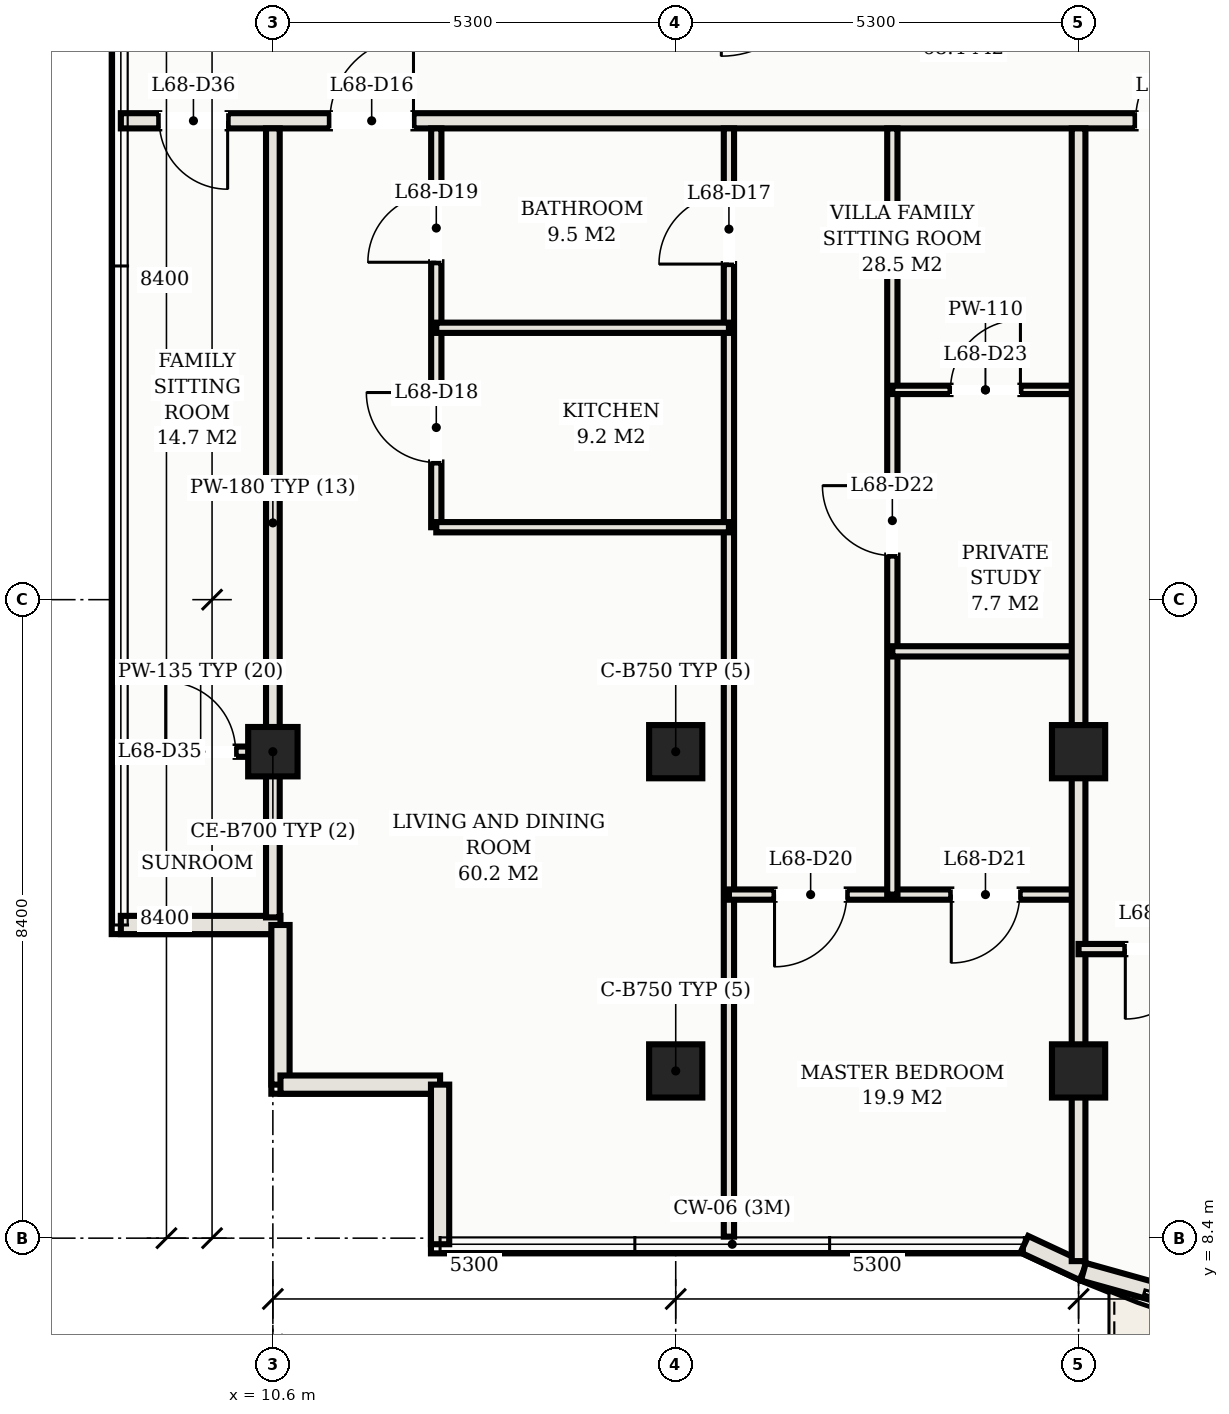
"""IFC4 building model, lengths in metres.
Left out: names, types, materials, properties, quantities, classifications, styles, units other than length and angle.
Written with IfcOpenShell. Run it as: python <this file> out.ifc"""

import sys

from ifc_helpers import new_model, si_unit, direction, frame, frame_2d, origin, origin_2d, place, context, subcontext, project, spatial, rectangle, hollow_rectangle, extrude, element, fill, save


model = new_model("IFC4")
c1 = context("Model", 3, precision=1e-05, world=origin(), true_north=direction((0.0, 1.0)))
c2 = subcontext(c1, "Body", "Model", "MODEL_VIEW")
j1 = project(units=[si_unit("LENGTHUNIT", "METRE"), si_unit("PLANEANGLEUNIT", "RADIAN")], contexts=[c1])
p1 = place(None, origin())
s1 = spatial("IfcSite", under=j1, at=p1, CompositionType="ELEMENT")
p2 = place(p1, origin())
s2 = spatial("IfcBuilding", under=s1, at=p2, CompositionType="ELEMENT")
p3 = place(p2, frame((0.0, 0.0, 246.2)))
s3 = spatial("IfcBuildingStorey", under=s2, at=p3, CompositionType="ELEMENT", Elevation=246.2)
for number, where, z_axis, x_axis in (
    (1, (15.9, 14.8, 0.0), (0.0, 0.0, 1.0), (1.0, 0.0, 0.0)),
    (2, (15.9, 10.6, 0.0), (0.0, 0.0, 1.0), (1.0, 0.0, 0.0)),
    (3, (21.2, 14.8, 0.0), (0.0, 0.0, 1.0), (1.0, 0.0, 0.0)),
    (4, (21.2, 10.6, 0.0), (0.0, 0.0, 1.0), (1.0, 0.0, 0.0)),
):
    element("IfcColumn", number, at=place(p3, frame(where, z_axis=z_axis, x_axis=x_axis)), inside=s3, PredefinedType="COLUMN", context=c2, shape_type="SweptSolid", body=[
        extrude(hollow_rectangle(XDim=0.7, YDim=0.7, WallThickness=0.025, at=origin_2d()), origin(), (0.0, 0.0, 1.0), 3.3),
    ])
p4 = place(p3, frame((10.6, 14.8, 0.0), z_axis=(0.0, 0.0, 1.0), x_axis=(1.0, 0.0, 0.0)))
e5 = element("IfcColumn", 5, at=p4, inside=s3, PredefinedType="COLUMN", context=c2, shape_type="SweptSolid", body=[
    extrude(hollow_rectangle(XDim=0.65, YDim=0.65, WallThickness=0.022, at=origin_2d()), origin(), (0.0, 0.0, 1.0), 3.3),
])
p5 = place(p3, frame((8.6, 12.52, 0.0), z_axis=(0.0, 0.0, 1.0), x_axis=(1.0, 0.0, 0.0)))
e6 = element("IfcWall", 6, at=p5, inside=s3, PredefinedType="SOLIDWALL", context=c2, shape_type="SweptSolid", body=[
    extrude(rectangle(XDim=2.1, YDim=0.24, at=frame_2d((1.05, 0.0))), origin(), (0.0, 0.0, 1.0), 3.11),
])
for number, where, z_axis, x_axis in (
    (7, (10.7, 12.52, 0.0), (0.0, 0.0, 1.0), (0.0, -1.0, 0.0)),
    (8, (10.7, 10.42, 0.0), (0.0, 0.0, 1.0), (1.0, 0.0, 0.0)),
):
    element("IfcWall", number, at=place(p3, frame(where, z_axis=z_axis, x_axis=x_axis)), inside=s3, PredefinedType="SOLIDWALL", context=c2, shape_type="SweptSolid", body=[
        extrude(rectangle(XDim=2.1, YDim=0.24, at=frame_2d((1.05, 0.0))), origin(), (0.0, 0.0, 1.0), 3.11),
    ])
p6 = place(p3, frame((12.8, 10.42, 0.0), z_axis=(0.0, 0.0, 1.0), x_axis=(0.0, -1.0, 0.0)))
e9 = element("IfcWall", 9, at=p6, inside=s3, PredefinedType="SOLIDWALL", context=c2, shape_type="SweptSolid", body=[
    extrude(rectangle(XDim=2.1, YDim=0.24, at=frame_2d((1.05, 0.0))), origin(), (0.0, 0.0, 1.0), 3.11),
])
p7 = place(p3, frame((20.487, 8.32, 0.0), z_axis=(0.0, 0.0, 1.0), x_axis=(0.906190424584, -0.422869855147, 0.0)))
e10 = element("IfcWall", 10, at=p7, inside=s3, PredefinedType="SOLIDWALL", context=c2, shape_type="SweptSolid", body=[
    extrude(rectangle(XDim=0.856, YDim=0.24, at=frame_2d((0.428, 0.0))), origin(), (0.0, 0.0, 1.0), 3.11),
])
p8 = place(p3, frame((21.263, 7.958, 0.0), z_axis=(0.0, 0.0, 1.0), x_axis=(0.963152398068, -0.268956238255, 0.0)))
e11 = element("IfcWall", 11, at=p8, inside=s3, PredefinedType="SOLIDWALL", context=c2, shape_type="SweptSolid", body=[
    extrude(rectangle(XDim=3.885, YDim=0.24, at=frame_2d((1.942, 0.0))), origin(), (0.0, 0.0, 1.0), 3.11),
])
p9 = place(p8, frame((1.169, 0.0, 0.0)))
e12 = element("IfcOpeningElement", 12, at=p9, cuts=e11, PredefinedType="OPENING", context=c2, shape_type="SweptSolid", body=[
    extrude(rectangle(XDim=1.8, YDim=2.2, at=frame_2d((0.9, 1.1))), frame((0.0, 0.13, 0.0), z_axis=(0.0, -1.0, 0.0), x_axis=(1.0, 0.0, 0.0)), (0.0, 0.0, 1.0), 0.26),
])
p10 = place(p3, frame((8.6, 23.1, 0.0), z_axis=(0.0, 0.0, 1.0), x_axis=(1.0, 0.0, 0.0)))
e13 = element("IfcWall", 13, at=p10, inside=s3, PredefinedType="PARTITIONING", context=c2, shape_type="SweptSolid", body=[
    extrude(rectangle(XDim=35.8, YDim=0.2, at=frame_2d((17.9, 0.0))), origin(), (0.0, 0.0, 1.0), 2.45),
])
p11 = place(p10, frame((2.75, 0.0, 0.0)))
e14 = element("IfcOpeningElement", 14, at=p11, cuts=e13, PredefinedType="OPENING", context=c2, shape_type="SweptSolid", body=[
    extrude(rectangle(XDim=1.1, YDim=2.25, at=frame_2d((0.55, 1.125))), frame((0.0, 0.11, 0.0), z_axis=(0.0, -1.0, 0.0), x_axis=(1.0, 0.0, 0.0)), (0.0, 0.0, 1.0), 0.22),
])
p12 = place(p10, frame((13.35, 0.0, 0.0)))
e15 = element("IfcOpeningElement", 15, at=p12, cuts=e13, PredefinedType="OPENING", context=c2, shape_type="SweptSolid", body=[
    extrude(rectangle(XDim=1.1, YDim=2.25, at=frame_2d((0.55, 1.125))), frame((0.0, 0.11, 0.0), z_axis=(0.0, -1.0, 0.0), x_axis=(1.0, 0.0, 0.0)), (0.0, 0.0, 1.0), 0.22),
])
p13 = place(p10, frame((23.95, 0.0, 0.0)))
e16 = element("IfcOpeningElement", 16, at=p13, cuts=e13, PredefinedType="OPENING", context=c2, shape_type="SweptSolid", body=[
    extrude(rectangle(XDim=1.1, YDim=2.25, at=frame_2d((0.55, 1.125))), frame((0.0, 0.11, 0.0), z_axis=(0.0, -1.0, 0.0), x_axis=(1.0, 0.0, 0.0)), (0.0, 0.0, 1.0), 0.22),
])
p14 = place(p10, frame((29.25, 0.0, 0.0)))
e17 = element("IfcOpeningElement", 17, at=p14, cuts=e13, PredefinedType="OPENING", context=c2, shape_type="SweptSolid", body=[
    extrude(rectangle(XDim=1.1, YDim=2.25, at=frame_2d((0.55, 1.125))), frame((0.0, 0.11, 0.0), z_axis=(0.0, -1.0, 0.0), x_axis=(1.0, 0.0, 0.0)), (0.0, 0.0, 1.0), 0.22),
])
p15 = place(p10, frame((0.505, 0.0, 0.0)))
e18 = element("IfcOpeningElement", 18, at=p15, cuts=e13, PredefinedType="OPENING", context=c2, shape_type="SweptSolid", body=[
    extrude(rectangle(XDim=0.9, YDim=2.15, at=frame_2d((0.45, 1.075))), frame((0.0, 0.11, 0.0), z_axis=(0.0, -1.0, 0.0), x_axis=(1.0, 0.0, 0.0)), (0.0, 0.0, 1.0), 0.22),
])
p16 = place(p10, frame((34.395, 0.0, 0.0)))
e19 = element("IfcOpeningElement", 19, at=p16, cuts=e13, PredefinedType="OPENING", context=c2, shape_type="SweptSolid", body=[
    extrude(rectangle(XDim=0.9, YDim=2.15, at=frame_2d((0.45, 1.075))), frame((0.0, 0.11, 0.0), z_axis=(0.0, -1.0, 0.0), x_axis=(1.0, 0.0, 0.0)), (0.0, 0.0, 1.0), 0.22),
])
p17 = place(p3, frame((10.6, 12.62, 0.0), z_axis=(0.0, 0.0, 1.0), x_axis=(0.0, 1.0, 0.0)))
e20 = element("IfcWall", 20, at=p17, inside=s3, PredefinedType="PARTITIONING", context=c2, shape_type="SweptSolid", body=[
    extrude(rectangle(XDim=10.38, YDim=0.18, at=frame_2d((5.19, 0.0))), origin(), (0.0, 0.0, 1.0), 2.45),
])
p18 = place(p3, frame((16.6, 8.42, 0.0), z_axis=(0.0, 0.0, 1.0), x_axis=(0.0, 1.0, 0.0)))
e21 = element("IfcWall", 21, at=p18, inside=s3, PredefinedType="PARTITIONING", context=c2, shape_type="SweptSolid", body=[
    extrude(rectangle(XDim=14.58, YDim=0.135, at=frame_2d((7.29, 0.0))), origin(), (0.0, 0.0, 1.0), 2.45),
])
p19 = place(p18, frame((12.795, 0.0, 0.0)))
e22 = element("IfcOpeningElement", 22, at=p19, cuts=e21, PredefinedType="OPENING", context=c2, shape_type="SweptSolid", body=[
    extrude(rectangle(XDim=0.92, YDim=2.15, at=frame_2d((0.46, 1.075))), frame((0.0, 0.078, 0.0), z_axis=(0.0, -1.0, 0.0), x_axis=(1.0, 0.0, 0.0)), (0.0, 0.0, 1.0), 0.155),
])
p20 = place(p3, frame((12.75, 17.753, 0.0), z_axis=(0.0, 0.0, 1.0), x_axis=(0.0, 1.0, 0.0)))
e23 = element("IfcWall", 23, at=p20, inside=s3, PredefinedType="PARTITIONING", context=c2, shape_type="SweptSolid", body=[
    extrude(rectangle(XDim=5.247, YDim=0.135, at=frame_2d((2.624, 0.0))), origin(), (0.0, 0.0, 1.0), 2.45),
])
p21 = place(p20, frame((0.852, 0.0, 0.0)))
e24 = element("IfcOpeningElement", 24, at=p21, cuts=e23, PredefinedType="OPENING", context=c2, shape_type="SweptSolid", body=[
    extrude(rectangle(XDim=0.92, YDim=2.15, at=frame_2d((0.46, 1.075))), frame((0.0, 0.078, 0.0), z_axis=(0.0, -1.0, 0.0), x_axis=(1.0, 0.0, 0.0)), (0.0, 0.0, 1.0), 0.155),
])
p22 = place(p20, frame((3.486, 0.0, 0.0)))
e25 = element("IfcOpeningElement", 25, at=p22, cuts=e23, PredefinedType="OPENING", context=c2, shape_type="SweptSolid", body=[
    extrude(rectangle(XDim=0.9, YDim=2.15, at=frame_2d((0.45, 1.075))), frame((0.0, 0.078, 0.0), z_axis=(0.0, -1.0, 0.0), x_axis=(1.0, 0.0, 0.0)), (0.0, 0.0, 1.0), 0.155),
])
for number, where, z_axis, x_axis in (
    (26, (12.75, 17.753, 0.0), (0.0, 0.0, 1.0), (1.0, 0.0, 0.0)),
    (27, (12.75, 20.377, 0.0), (0.0, 0.0, 1.0), (1.0, 0.0, 0.0)),
):
    element("IfcWall", number, at=place(p3, frame(where, z_axis=z_axis, x_axis=x_axis)), inside=s3, PredefinedType="PARTITIONING", context=c2, shape_type="SweptSolid", body=[
        extrude(rectangle(XDim=3.85, YDim=0.135, at=frame_2d((1.925, 0.0))), origin(), (0.0, 0.0, 1.0), 2.45),
    ])
p23 = place(p3, frame((16.6, 12.92, 0.0), z_axis=(0.0, 0.0, 1.0), x_axis=(1.0, 0.0, 0.0)))
e28 = element("IfcWall", 28, at=p23, inside=s3, PredefinedType="PARTITIONING", context=c2, shape_type="SweptSolid", body=[
    extrude(rectangle(XDim=4.6, YDim=0.135, at=frame_2d((2.3, 0.0))), origin(), (0.0, 0.0, 1.0), 2.45),
])
p24 = place(p23, frame((0.6, 0.0, 0.0)))
e29 = element("IfcOpeningElement", 29, at=p24, cuts=e28, PredefinedType="OPENING", context=c2, shape_type="SweptSolid", body=[
    extrude(rectangle(XDim=0.95, YDim=2.15, at=frame_2d((0.475, 1.075))), frame((0.0, 0.078, 0.0), z_axis=(0.0, -1.0, 0.0), x_axis=(1.0, 0.0, 0.0)), (0.0, 0.0, 1.0), 0.155),
])
p25 = place(p23, frame((2.925, 0.0, 0.0)))
e30 = element("IfcOpeningElement", 30, at=p25, cuts=e28, PredefinedType="OPENING", context=c2, shape_type="SweptSolid", body=[
    extrude(rectangle(XDim=0.9, YDim=2.15, at=frame_2d((0.45, 1.075))), frame((0.0, 0.078, 0.0), z_axis=(0.0, -1.0, 0.0), x_axis=(1.0, 0.0, 0.0)), (0.0, 0.0, 1.0), 0.155),
])
p26 = place(p3, frame((18.75, 12.92, 0.0), z_axis=(0.0, 0.0, 1.0), x_axis=(0.0, 1.0, 0.0)))
e31 = element("IfcWall", 31, at=p26, inside=s3, PredefinedType="PARTITIONING", context=c2, shape_type="SweptSolid", body=[
    extrude(rectangle(XDim=10.08, YDim=0.135, at=frame_2d((5.04, 0.0))), origin(), (0.0, 0.0, 1.0), 2.45),
])
p27 = place(p26, frame((4.46, 0.0, 0.0)))
e32 = element("IfcOpeningElement", 32, at=p27, cuts=e31, PredefinedType="OPENING", context=c2, shape_type="SweptSolid", body=[
    extrude(rectangle(XDim=0.92, YDim=2.15, at=frame_2d((0.46, 1.075))), frame((0.0, 0.078, 0.0), z_axis=(0.0, -1.0, 0.0), x_axis=(1.0, 0.0, 0.0)), (0.0, 0.0, 1.0), 0.155),
])
p28 = place(p3, frame((18.75, 16.12, 0.0), z_axis=(0.0, 0.0, 1.0), x_axis=(1.0, 0.0, 0.0)))
e33 = element("IfcWall", 33, at=p28, inside=s3, PredefinedType="PARTITIONING", context=c2, shape_type="SweptSolid", body=[
    extrude(rectangle(XDim=2.45, YDim=0.135, at=frame_2d((1.225, 0.0))), origin(), (0.0, 0.0, 1.0), 2.45),
])
p29 = place(p3, frame((18.75, 19.56, 0.0), z_axis=(0.0, 0.0, 1.0), x_axis=(1.0, 0.0, 0.0)))
e34 = element("IfcWall", 34, at=p29, inside=s3, PredefinedType="MOVABLE", context=c2, shape_type="SweptSolid", body=[
    extrude(rectangle(XDim=2.45, YDim=0.11, at=frame_2d((1.225, 0.0))), origin(), (0.0, 0.0, 1.0), 2.45),
])
p30 = place(p29, frame((0.765, 0.0, 0.0)))
e35 = element("IfcOpeningElement", 35, at=p30, cuts=e34, PredefinedType="OPENING", context=c2, shape_type="SweptSolid", body=[
    extrude(rectangle(XDim=0.92, YDim=2.15, at=frame_2d((0.46, 1.075))), frame((0.0, 0.065, 0.0), z_axis=(0.0, -1.0, 0.0), x_axis=(1.0, 0.0, 0.0)), (0.0, 0.0, 1.0), 0.13),
])
p31 = place(p3, frame((21.2, 8.098, 0.0), z_axis=(0.0, 0.0, 1.0), x_axis=(0.0, 1.0, 0.0)))
e36 = element("IfcWall", 36, at=p31, inside=s3, PredefinedType="PARTITIONING", context=c2, shape_type="SweptSolid", body=[
    extrude(rectangle(XDim=14.902, YDim=0.18, at=frame_2d((7.451, 0.0))), origin(), (0.0, 0.0, 1.0), 2.45),
])
p32 = place(p3, frame((21.2, 12.203, 0.0), z_axis=(0.0, 0.0, 1.0), x_axis=(1.0, 0.0, 0.0)))
e37 = element("IfcWall", 37, at=p32, inside=s3, PredefinedType="PARTITIONING", context=c2, shape_type="SweptSolid", body=[
    extrude(rectangle(XDim=10.6, YDim=0.135, at=frame_2d((5.3, 0.0))), origin(), (0.0, 0.0, 1.0), 2.45),
])
p33 = place(p32, frame((0.615, 0.0, 0.0)))
e38 = element("IfcOpeningElement", 38, at=p33, cuts=e37, PredefinedType="OPENING", context=c2, shape_type="SweptSolid", body=[
    extrude(rectangle(XDim=0.92, YDim=2.15, at=frame_2d((0.46, 1.075))), frame((0.0, 0.078, 0.0), z_axis=(0.0, -1.0, 0.0), x_axis=(1.0, 0.0, 0.0)), (0.0, 0.0, 1.0), 0.155),
])
p34 = place(p3, frame((8.7, 14.8, 0.0), z_axis=(0.0, 0.0, 1.0), x_axis=(1.0, 0.0, 0.0)))
e39 = element("IfcWall", 39, at=p34, inside=s3, PredefinedType="PARTITIONING", context=c2, shape_type="SweptSolid", body=[
    extrude(rectangle(XDim=1.9, YDim=0.135, at=frame_2d((0.95, 0.0))), origin(), (0.0, 0.0, 1.0), 2.45),
])
p35 = place(p34, frame((0.49, 0.0, 0.0)))
e40 = element("IfcOpeningElement", 40, at=p35, cuts=e39, PredefinedType="OPENING", context=c2, shape_type="SweptSolid", body=[
    extrude(rectangle(XDim=0.92, YDim=2.15, at=frame_2d((0.46, 1.075))), frame((0.0, 0.078, 0.0), z_axis=(0.0, -1.0, 0.0), x_axis=(1.0, 0.0, 0.0)), (0.0, 0.0, 1.0), 0.155),
])
p36 = place(p11, origin())
e41 = element("IfcDoor", 41, at=p36, inside=s3, OperationType="SINGLE_SWING_RIGHT", PredefinedType="DOOR", context=c2, shape_type="SweptSolid", body=[
    extrude(rectangle(XDim=1.1, YDim=2.25, at=frame_2d((0.55, 1.125))), frame((0.0, 0.025, 0.0), z_axis=(0.0, -1.0, 0.0), x_axis=(1.0, 0.0, 0.0)), (0.0, 0.0, 1.0), 0.05),
])
fill(e14, e41)
p37 = place(p19, origin())
e42 = element("IfcDoor", 42, at=p37, inside=s3, OperationType="SINGLE_SWING_LEFT", PredefinedType="DOOR", context=c2, shape_type="SweptSolid", body=[
    extrude(rectangle(XDim=0.92, YDim=2.15, at=frame_2d((0.46, 1.075))), frame((0.0, 0.025, 0.0), z_axis=(0.0, -1.0, 0.0), x_axis=(1.0, 0.0, 0.0)), (0.0, 0.0, 1.0), 0.05),
])
fill(e22, e42)
p38 = place(p21, origin())
e43 = element("IfcDoor", 43, at=p38, inside=s3, OperationType="SINGLE_SWING_RIGHT", PredefinedType="DOOR", context=c2, shape_type="SweptSolid", body=[
    extrude(rectangle(XDim=0.92, YDim=2.15, at=frame_2d((0.46, 1.075))), frame((0.0, 0.025, 0.0), z_axis=(0.0, -1.0, 0.0), x_axis=(1.0, 0.0, 0.0)), (0.0, 0.0, 1.0), 0.05),
])
fill(e24, e43)
p39 = place(p22, origin())
e44 = element("IfcDoor", 44, at=p39, inside=s3, OperationType="SINGLE_SWING_LEFT", PredefinedType="DOOR", context=c2, shape_type="SweptSolid", body=[
    extrude(rectangle(XDim=0.9, YDim=2.15, at=frame_2d((0.45, 1.075))), frame((0.0, 0.025, 0.0), z_axis=(0.0, -1.0, 0.0), x_axis=(1.0, 0.0, 0.0)), (0.0, 0.0, 1.0), 0.05),
])
fill(e25, e44)
p40 = place(p24, frame((0.95, 0.0, 0.0), z_axis=(0.0, 0.0, 1.0), x_axis=(-1.0, 0.0, 0.0)))
e45 = element("IfcDoor", 45, at=p40, inside=s3, OperationType="SINGLE_SWING_RIGHT", PredefinedType="DOOR", context=c2, shape_type="SweptSolid", body=[
    extrude(rectangle(XDim=0.95, YDim=2.15, at=frame_2d((0.475, 1.075))), frame((0.0, 0.025, 0.0), z_axis=(0.0, -1.0, 0.0), x_axis=(1.0, 0.0, 0.0)), (0.0, 0.0, 1.0), 0.05),
])
fill(e29, e45)
p41 = place(p25, frame((0.9, 0.0, 0.0), z_axis=(0.0, 0.0, 1.0), x_axis=(-1.0, 0.0, 0.0)))
e46 = element("IfcDoor", 46, at=p41, inside=s3, OperationType="SINGLE_SWING_RIGHT", PredefinedType="DOOR", context=c2, shape_type="SweptSolid", body=[
    extrude(rectangle(XDim=0.9, YDim=2.15, at=frame_2d((0.45, 1.075))), frame((0.0, 0.025, 0.0), z_axis=(0.0, -1.0, 0.0), x_axis=(1.0, 0.0, 0.0)), (0.0, 0.0, 1.0), 0.05),
])
fill(e30, e46)
p42 = place(p27, origin())
e47 = element("IfcDoor", 47, at=p42, inside=s3, OperationType="SINGLE_SWING_RIGHT", PredefinedType="DOOR", context=c2, shape_type="SweptSolid", body=[
    extrude(rectangle(XDim=0.92, YDim=2.15, at=frame_2d((0.46, 1.075))), frame((0.0, 0.025, 0.0), z_axis=(0.0, -1.0, 0.0), x_axis=(1.0, 0.0, 0.0)), (0.0, 0.0, 1.0), 0.05),
])
fill(e32, e47)
p43 = place(p30, origin())
e48 = element("IfcDoor", 48, at=p43, inside=s3, OperationType="SINGLE_SWING_RIGHT", PredefinedType="DOOR", context=c2, shape_type="SweptSolid", body=[
    extrude(rectangle(XDim=0.92, YDim=2.15, at=frame_2d((0.46, 1.075))), frame((0.0, 0.025, 0.0), z_axis=(0.0, -1.0, 0.0), x_axis=(1.0, 0.0, 0.0)), (0.0, 0.0, 1.0), 0.05),
])
fill(e35, e48)
p44 = place(p12, origin())
e49 = element("IfcDoor", 49, at=p44, inside=s3, OperationType="SINGLE_SWING_RIGHT", PredefinedType="DOOR", context=c2, shape_type="SweptSolid", body=[
    extrude(rectangle(XDim=1.1, YDim=2.25, at=frame_2d((0.55, 1.125))), frame((0.0, 0.025, 0.0), z_axis=(0.0, -1.0, 0.0), x_axis=(1.0, 0.0, 0.0)), (0.0, 0.0, 1.0), 0.05),
])
fill(e15, e49)
p45 = place(p33, frame((0.92, 0.0, 0.0), z_axis=(0.0, 0.0, 1.0), x_axis=(-1.0, 0.0, 0.0)))
e50 = element("IfcDoor", 50, at=p45, inside=s3, OperationType="SINGLE_SWING_RIGHT", PredefinedType="DOOR", context=c2, shape_type="SweptSolid", body=[
    extrude(rectangle(XDim=0.92, YDim=2.15, at=frame_2d((0.46, 1.075))), frame((0.0, 0.025, 0.0), z_axis=(0.0, -1.0, 0.0), x_axis=(1.0, 0.0, 0.0)), (0.0, 0.0, 1.0), 0.05),
])
fill(e38, e50)
p46 = place(p35, origin())
e51 = element("IfcDoor", 51, at=p46, inside=s3, OperationType="SINGLE_SWING_LEFT", PredefinedType="DOOR", context=c2, shape_type="SweptSolid", body=[
    extrude(rectangle(XDim=0.92, YDim=2.15, at=frame_2d((0.46, 1.075))), frame((0.0, 0.025, 0.0), z_axis=(0.0, -1.0, 0.0), x_axis=(1.0, 0.0, 0.0)), (0.0, 0.0, 1.0), 0.05),
])
fill(e40, e51)
p47 = place(p15, frame((0.9, 0.0, 0.0), z_axis=(0.0, 0.0, 1.0), x_axis=(-1.0, 0.0, 0.0)))
e52 = element("IfcDoor", 52, at=p47, inside=s3, OperationType="SINGLE_SWING_LEFT", PredefinedType="DOOR", context=c2, shape_type="SweptSolid", body=[
    extrude(rectangle(XDim=0.9, YDim=2.15, at=frame_2d((0.45, 1.075))), frame((0.0, 0.025, 0.0), z_axis=(0.0, -1.0, 0.0), x_axis=(1.0, 0.0, 0.0)), (0.0, 0.0, 1.0), 0.05),
])
fill(e18, e52)
save(model, sys.argv[1])
